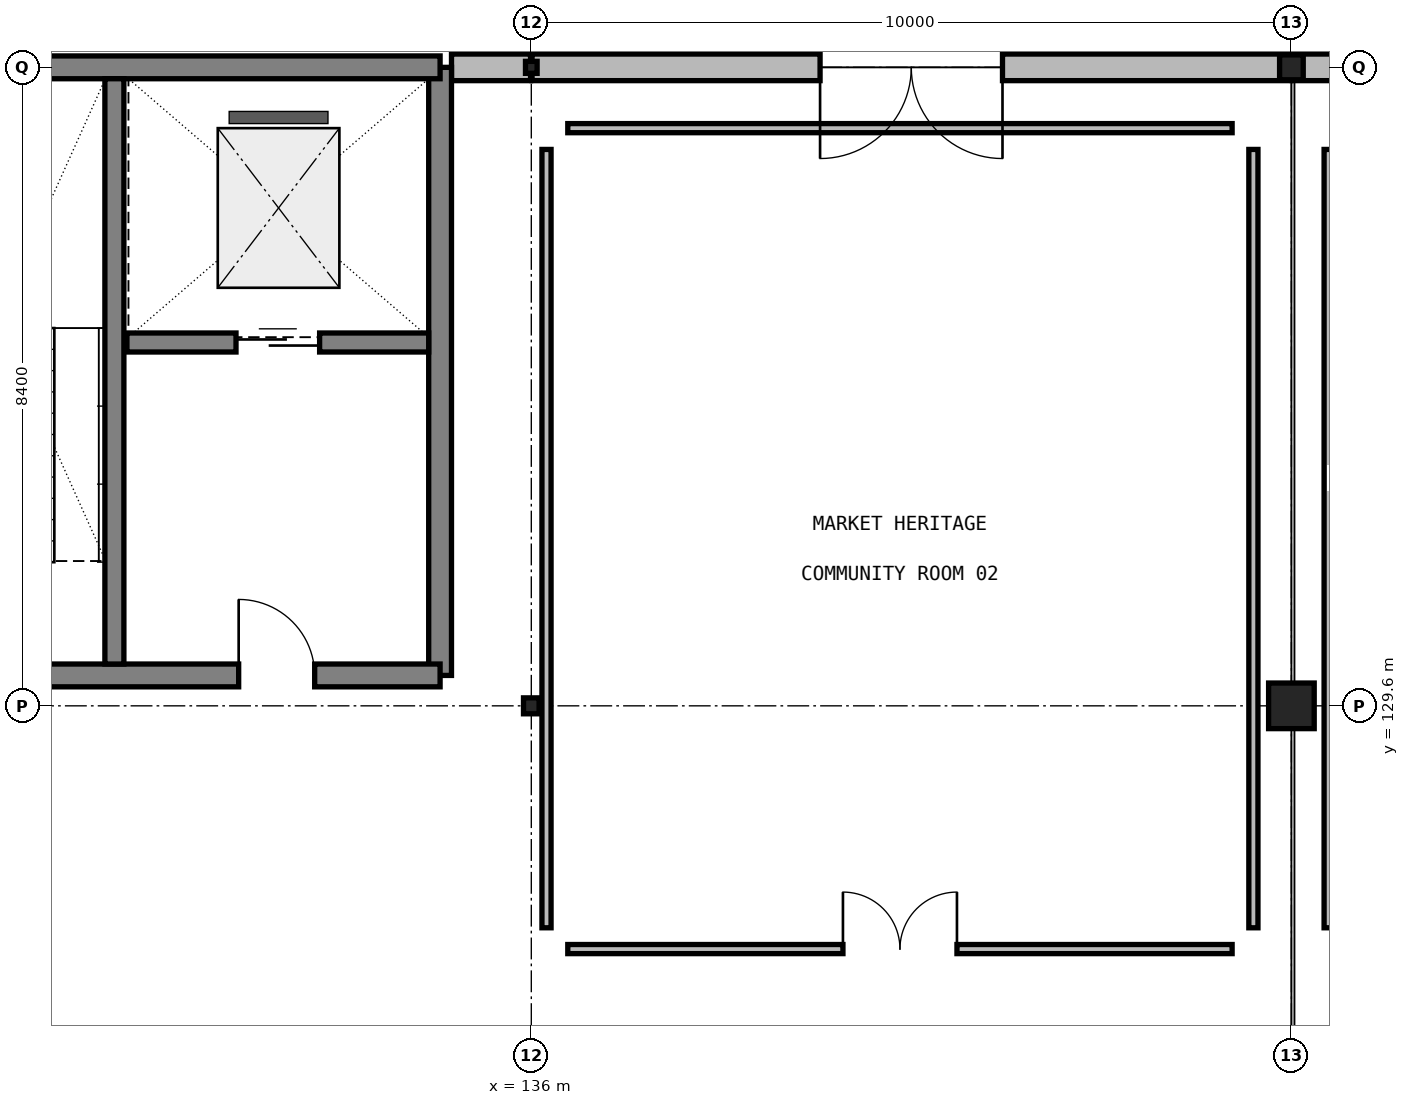
"""IFC4 building model, lengths in metres.
Left out: names, types, materials, properties, quantities, classifications, styles, units other than length and angle.
Written with IfcOpenShell. Run it as: python <this file> out.ifc"""

import sys

from ifc_helpers import new_model, si_unit, direction, frame, frame_2d, origin, origin_2d_with_axis, place, context, subcontext, project, spatial, rectangle, i_section, extrude, element, fill, save


model = new_model("IFC4")
c1 = context("Model", 3, precision=1e-05, world=origin(), true_north=direction((0.0, 1.0)))
c2 = subcontext(c1, "Body", "Model", "MODEL_VIEW")
j1 = project(units=[si_unit("LENGTHUNIT", "METRE"), si_unit("PLANEANGLEUNIT", "RADIAN")], contexts=[c1])
p1 = place(None, origin())
s1 = spatial("IfcSite", under=j1, at=p1, CompositionType="ELEMENT")
p2 = place(p1, origin())
s2 = spatial("IfcBuilding", under=s1, at=p2, CompositionType="ELEMENT")
p3 = place(p2, origin())
s3 = spatial("IfcBuildingStorey", under=s2, at=p3, CompositionType="ELEMENT", Elevation=0.0)
p4 = place(p3, frame((136.0, 129.6, 0.0), z_axis=(0.0, 0.0, 1.0), x_axis=(1.0, 0.0, 0.0)))
e1 = element("IfcColumn", 1, at=p4, inside=s3, PredefinedType="COLUMN", context=c2, shape_type="SweptSolid", body=[
    extrude(i_section(OverallWidth=0.205, OverallDepth=0.21, WebThickness=0.009, FlangeThickness=0.014, FilletRadius=0.011, at=origin_2d_with_axis()), origin(), (0.0, 0.0, 1.0), 4.5),
])
p5 = place(p3, frame((136.0, 138.0, 0.0), z_axis=(0.0, 0.0, 1.0), x_axis=(1.0, 0.0, 0.0)))
e2 = element("IfcColumn", 2, at=p5, inside=s3, PredefinedType="COLUMN", context=c2, shape_type="SweptSolid", body=[
    extrude(i_section(OverallWidth=0.153, OverallDepth=0.158, WebThickness=0.007, FlangeThickness=0.01, FilletRadius=0.009, at=origin_2d_with_axis()), origin(), (0.0, 0.0, 1.0), 4.5),
])
p6 = place(p3, frame((146.0, 129.6, 0.0), z_axis=(0.0, 0.0, 1.0), x_axis=(1.0, 0.0, 0.0)))
e3 = element("IfcColumn", 3, at=p6, inside=s3, PredefinedType="COLUMN", context=c2, shape_type="SweptSolid", body=[
    extrude(rectangle(XDim=0.6, YDim=0.6, at=origin_2d_with_axis()), origin(), (0.0, 0.0, 1.0), 4.5),
])
p7 = place(p3, frame((146.0, 138.0, 0.0), z_axis=(0.0, 0.0, 1.0), x_axis=(1.0, 0.0, 0.0)))
e4 = element("IfcColumn", 4, at=p7, inside=s3, PredefinedType="COLUMN", context=c2, shape_type="SweptSolid", body=[
    extrude(i_section(OverallWidth=0.311, OverallDepth=0.327, WebThickness=0.016, FlangeThickness=0.025, FilletRadius=0.017, at=origin_2d_with_axis()), origin(), (0.0, 0.0, 1.0), 4.5),
])
p8 = place(p3, frame((135.99, 138.0, 0.0), z_axis=(0.0, 0.0, 1.0), x_axis=(-1.0, 0.0, 0.0)))
e5 = element("IfcWall", 5, at=p8, inside=s3, PredefinedType="SOLIDWALL", context=c2, shape_type="SweptSolid", body=[
    extrude(rectangle(XDim=1.04, YDim=0.35, at=frame_2d((0.52, 0.0), x_axis=(1.0, 0.0))), origin(), (0.0, 0.0, 1.0), 3.88),
])
p9 = place(p3, frame((145.988, 138.0, 0.0), z_axis=(0.0, 0.0, 1.0), x_axis=(-1.0, 0.0, 0.0)))
e6 = element("IfcWall", 6, at=p9, inside=s3, PredefinedType="SOLIDWALL", context=c2, shape_type="SweptSolid", body=[
    extrude(rectangle(XDim=9.978, YDim=0.35, at=frame_2d((4.989, 0.0), x_axis=(1.0, 0.0))), origin(), (0.0, 0.0, 1.0), 3.88),
])
p10 = place(p9, frame((3.789, 0.0, 0.0)))
e7 = element("IfcOpeningElement", 7, at=p10, cuts=e6, PredefinedType="OPENING", context=c2, shape_type="SweptSolid", body=[
    extrude(rectangle(XDim=2.4, YDim=2.8, at=frame_2d((1.2, 1.4), x_axis=(1.0, 0.0))), frame((0.0, 0.185, 0.0), z_axis=(0.0, -1.0, 0.0), x_axis=(1.0, 0.0, 0.0)), (0.0, 0.0, 1.0), 0.37),
])
p11 = place(p3, frame((155.99, 138.0, 0.0), z_axis=(0.0, 0.0, 1.0), x_axis=(-1.0, 0.0, 0.0)))
e8 = element("IfcWall", 8, at=p11, inside=s3, PredefinedType="SOLIDWALL", context=c2, shape_type="SweptSolid", body=[
    extrude(rectangle(XDim=9.978, YDim=0.35, at=frame_2d((4.989, 0.0), x_axis=(1.0, 0.0))), origin(), (0.0, 0.0, 1.0), 3.88),
])
p12 = place(p11, frame((3.789, 0.0, 0.0)))
e9 = element("IfcOpeningElement", 9, at=p12, cuts=e8, PredefinedType="OPENING", context=c2, shape_type="SweptSolid", body=[
    extrude(rectangle(XDim=2.4, YDim=2.8, at=frame_2d((1.2, 1.4), x_axis=(1.0, 0.0))), frame((0.0, 0.185, 0.0), z_axis=(0.0, -1.0, 0.0), x_axis=(1.0, 0.0, 0.0)), (0.0, 0.0, 1.0), 0.37),
])
p13 = place(p3, frame((134.8, 130.0, 0.0), z_axis=(0.0, 0.0, 1.0), x_axis=(0.0, 1.0, 0.0)))
e10 = element("IfcWall", 10, at=p13, inside=s3, PredefinedType="SHEAR", context=c2, shape_type="SweptSolid", body=[
    extrude(rectangle(XDim=8.0, YDim=0.3, at=frame_2d((4.0, 0.0), x_axis=(1.0, 0.0))), origin(), (0.0, 0.0, 1.0), 4.5),
])
p14 = place(p3, frame((127.4, 130.0, 0.0), z_axis=(0.0, 0.0, 1.0), x_axis=(1.0, 0.0, 0.0)))
e11 = element("IfcWall", 11, at=p14, inside=s3, PredefinedType="SHEAR", context=c2, shape_type="SweptSolid", body=[
    extrude(rectangle(XDim=7.4, YDim=0.3, at=frame_2d((3.7, 0.0), x_axis=(1.0, 0.0))), origin(), (0.0, 0.0, 1.0), 4.5),
])
p15 = place(p14, frame((1.1, 0.0, 0.0)))
e12 = element("IfcOpeningElement", 12, at=p15, cuts=e11, PredefinedType="OPENING", context=c2, shape_type="SweptSolid", body=[
    extrude(rectangle(XDim=1.0, YDim=2.15, at=frame_2d((0.5, 1.075), x_axis=(1.0, 0.0))), frame((0.0, 0.16, 0.0), z_axis=(0.0, -1.0, 0.0), x_axis=(1.0, 0.0, 0.0)), (0.0, 0.0, 1.0), 0.32),
])
p16 = place(p14, frame((4.75, 0.0, 0.0)))
e13 = element("IfcOpeningElement", 13, at=p16, cuts=e11, PredefinedType="OPENING", context=c2, shape_type="SweptSolid", body=[
    extrude(rectangle(XDim=1.0, YDim=2.15, at=frame_2d((0.5, 1.075), x_axis=(1.0, 0.0))), frame((0.0, 0.16, 0.0), z_axis=(0.0, -1.0, 0.0), x_axis=(1.0, 0.0, 0.0)), (0.0, 0.0, 1.0), 0.32),
])
p17 = place(p3, frame((134.8, 138.0, 0.0), z_axis=(0.0, 0.0, 1.0), x_axis=(-1.0, 0.0, 0.0)))
e14 = element("IfcWall", 14, at=p17, inside=s3, PredefinedType="SHEAR", context=c2, shape_type="SweptSolid", body=[
    extrude(rectangle(XDim=7.4, YDim=0.3, at=frame_2d((3.7, 0.0), x_axis=(1.0, 0.0))), origin(), (0.0, 0.0, 1.0), 4.5),
])
p18 = place(p3, frame((130.515, 130.15, 0.0), z_axis=(0.0, 0.0, 1.0), x_axis=(0.0, 1.0, 0.0)))
e15 = element("IfcWall", 15, at=p18, inside=s3, PredefinedType="SHEAR", context=c2, shape_type="SweptSolid", body=[
    extrude(rectangle(XDim=7.7, YDim=0.25, at=frame_2d((3.85, 0.0), x_axis=(1.0, 0.0))), origin(), (0.0, 0.0, 1.0), 4.5),
])
p19 = place(p3, frame((130.68, 134.38, 0.0), z_axis=(0.0, 0.0, 1.0), x_axis=(1.0, 0.0, 0.0)))
e16 = element("IfcWall", 16, at=p19, inside=s3, PredefinedType="SHEAR", context=c2, shape_type="SweptSolid", body=[
    extrude(rectangle(XDim=3.97, YDim=0.25, at=frame_2d((1.985, 0.0), x_axis=(1.0, 0.0))), origin(), (0.0, 0.0, 1.0), 4.24),
])
p20 = place(p19, frame((1.435, 0.0, 0.0)))
e17 = element("IfcOpeningElement", 17, at=p20, cuts=e16, PredefinedType="OPENING", context=c2, shape_type="SweptSolid", body=[
    extrude(rectangle(XDim=1.1, YDim=2.15, at=frame_2d((0.55, 1.075), x_axis=(1.0, 0.0))), frame((0.0, 0.135, 0.0), z_axis=(0.0, -1.0, 0.0), x_axis=(1.0, 0.0, 0.0)), (0.0, 0.0, 1.0), 0.27),
])
p21 = place(p3, frame((136.48, 126.4, 0.0), z_axis=(0.0, 0.0, 1.0), x_axis=(1.0, 0.0, 0.0)))
e18 = element("IfcWall", 18, at=p21, inside=s3, PredefinedType="PARTITIONING", context=c2, shape_type="SweptSolid", body=[
    extrude(rectangle(XDim=8.74, YDim=0.12, at=frame_2d((4.37, 0.0), x_axis=(1.0, 0.0))), origin(), (0.0, 0.0, 1.0), 3.62),
])
p22 = place(p21, frame((3.62, 0.0, 0.0)))
e19 = element("IfcOpeningElement", 19, at=p22, cuts=e18, PredefinedType="OPENING", context=c2, shape_type="SweptSolid", body=[
    extrude(rectangle(XDim=1.5, YDim=2.25, at=frame_2d((0.75, 1.125), x_axis=(1.0, 0.0))), frame((0.0, 0.07, 0.0), z_axis=(0.0, -1.0, 0.0), x_axis=(1.0, 0.0, 0.0)), (0.0, 0.0, 1.0), 0.14),
])
p23 = place(p3, frame((145.5, 126.68, 0.0), z_axis=(0.0, 0.0, 1.0), x_axis=(0.0, 1.0, 0.0)))
e20 = element("IfcWall", 20, at=p23, inside=s3, PredefinedType="PARTITIONING", context=c2, shape_type="SweptSolid", body=[
    extrude(rectangle(XDim=10.24, YDim=0.12, at=frame_2d((5.12, 0.0), x_axis=(1.0, 0.0))), origin(), (0.0, 0.0, 1.0), 3.62),
])
p24 = place(p3, frame((145.22, 137.2, 0.0), z_axis=(0.0, 0.0, 1.0), x_axis=(-1.0, 0.0, 0.0)))
e21 = element("IfcWall", 21, at=p24, inside=s3, PredefinedType="PARTITIONING", context=c2, shape_type="SweptSolid", body=[
    extrude(rectangle(XDim=8.74, YDim=0.12, at=frame_2d((4.37, 0.0), x_axis=(1.0, 0.0))), origin(), (0.0, 0.0, 1.0), 3.62),
])
p25 = place(p3, frame((136.2, 136.92, 0.0), z_axis=(0.0, 0.0, 1.0), x_axis=(0.0, -1.0, 0.0)))
e22 = element("IfcWall", 22, at=p25, inside=s3, PredefinedType="PARTITIONING", context=c2, shape_type="SweptSolid", body=[
    extrude(rectangle(XDim=10.24, YDim=0.12, at=frame_2d((5.12, 0.0), x_axis=(1.0, 0.0))), origin(), (0.0, 0.0, 1.0), 3.62),
])
p26 = place(p3, frame((146.5, 136.92, 0.0), z_axis=(0.0, 0.0, 1.0), x_axis=(0.0, -1.0, 0.0)))
e23 = element("IfcWall", 23, at=p26, inside=s3, PredefinedType="PLUMBINGWALL", context=c2, shape_type="SweptSolid", body=[
    extrude(rectangle(XDim=10.24, YDim=0.14, at=frame_2d((5.12, 0.0), x_axis=(1.0, 0.0))), origin(), (0.0, 0.0, 1.0), 3.62),
])
p27 = place(p10, origin())
e24 = element("IfcDoor", 24, at=p27, inside=s3, OperationType="DOUBLE_SWING_LEFT", PredefinedType="DOOR", context=c2, shape_type="SweptSolid", body=[
    extrude(rectangle(XDim=2.4, YDim=2.8, at=frame_2d((1.2, 1.4), x_axis=(1.0, 0.0))), frame((0.0, 0.025, 0.0), z_axis=(0.0, -1.0, 0.0), x_axis=(1.0, 0.0, 0.0)), (0.0, 0.0, 1.0), 0.05),
])
fill(e7, e24)
p28 = place(p16, origin())
e25 = element("IfcDoor", 25, at=p28, inside=s3, OperationType="SINGLE_SWING_LEFT", PredefinedType="DOOR", context=c2, shape_type="SweptSolid", body=[
    extrude(rectangle(XDim=1.0, YDim=2.15, at=frame_2d((0.5, 1.075), x_axis=(1.0, 0.0))), frame((0.0, 0.025, 0.0), z_axis=(0.0, -1.0, 0.0), x_axis=(1.0, 0.0, 0.0)), (0.0, 0.0, 1.0), 0.05),
])
fill(e13, e25)
p29 = place(p20, origin())
e26 = element("IfcDoor", 26, at=p29, inside=s3, OperationType="SLIDING_TO_LEFT", PredefinedType="DOOR", context=c2, shape_type="SweptSolid", body=[
    extrude(rectangle(XDim=1.1, YDim=2.15, at=frame_2d((0.55, 1.075), x_axis=(1.0, 0.0))), frame((0.0, 0.025, 0.0), z_axis=(0.0, -1.0, 0.0), x_axis=(1.0, 0.0, 0.0)), (0.0, 0.0, 1.0), 0.05),
])
fill(e17, e26)
p30 = place(p22, origin())
e27 = element("IfcDoor", 27, at=p30, inside=s3, OperationType="DOUBLE_SWING_RIGHT", PredefinedType="DOOR", context=c2, shape_type="SweptSolid", body=[
    extrude(rectangle(XDim=1.5, YDim=2.25, at=frame_2d((0.75, 1.125), x_axis=(1.0, 0.0))), frame((0.0, 0.025, 0.0), z_axis=(0.0, -1.0, 0.0), x_axis=(1.0, 0.0, 0.0)), (0.0, 0.0, 1.0), 0.05),
])
fill(e19, e27)
save(model, sys.argv[1])
